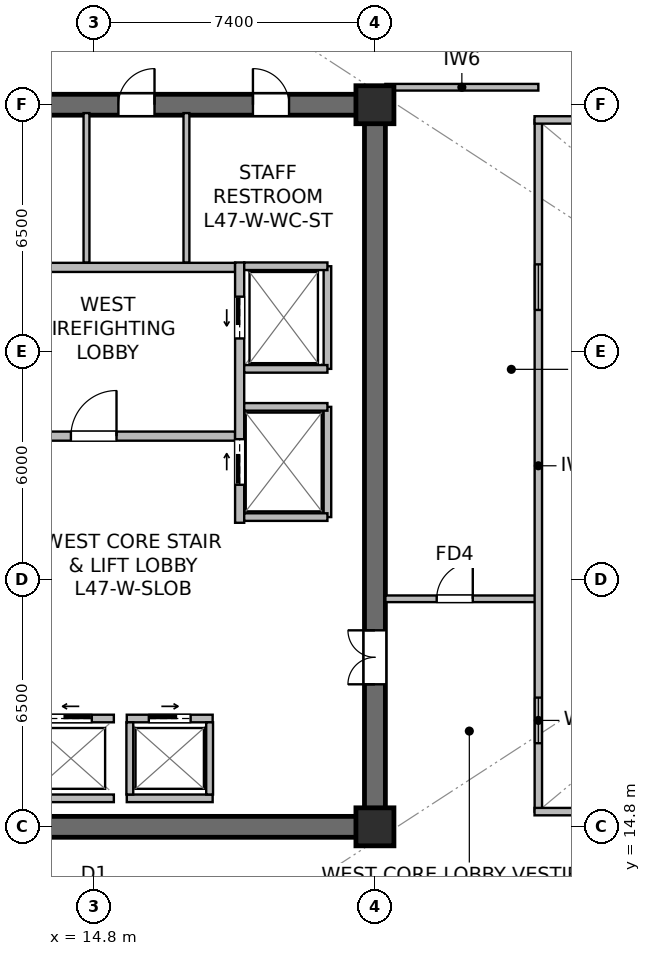
"""IFC4 building model, lengths in metres.
Left out: names, types, materials, properties, quantities, classifications, styles, units other than length and angle.
Written with IfcOpenShell. Run it as: python <this file> out.ifc"""

import sys

from ifc_helpers import new_model, si_unit, direction, frame, frame_2d, origin, origin_2d, place, context, subcontext, project, spatial, rectangle, extrude, source, transform, mapped, element, fill, save


model = new_model("IFC4")
c1 = context("Model", 3, precision=1e-05, world=origin(), true_north=direction((0.0, 1.0)))
c2 = subcontext(c1, "Body", "Model", "MODEL_VIEW")
j1 = project(units=[si_unit("LENGTHUNIT", "METRE"), si_unit("PLANEANGLEUNIT", "RADIAN")], contexts=[c1])
p1 = place(None, origin())
s1 = spatial("IfcSite", under=j1, at=p1, CompositionType="ELEMENT")
p2 = place(p1, origin())
s2 = spatial("IfcBuilding", under=s1, at=p2, CompositionType="ELEMENT")
p3 = place(p2, frame((0.0, 0.0, 196.6)))
s3 = spatial("IfcBuildingStorey", under=s2, at=p3, CompositionType="ELEMENT", Elevation=196.6)
p4 = place(p3, frame((7.125, 14.8, 0.0), z_axis=(0.0, 0.0, 1.0), x_axis=(1.0, 0.0, 0.0)))
e1 = element("IfcWall", 1, at=p4, inside=s3, PredefinedType="SHEAR", context=c2, shape_type="SweptSolid", body=[
    extrude(rectangle(XDim=15.35, YDim=0.55, at=frame_2d((7.675, 0.0))), origin(), (0.0, 0.0, 1.0), 4.5),
])
p5 = place(p3, frame((7.125, 33.8, 0.0), z_axis=(0.0, 0.0, 1.0), x_axis=(1.0, 0.0, 0.0)))
e2 = element("IfcWall", 2, at=p5, inside=s3, PredefinedType="SHEAR", context=c2, shape_type="SweptSolid", body=[
    extrude(rectangle(XDim=15.35, YDim=0.55, at=frame_2d((7.675, 0.0))), origin(), (0.0, 0.0, 1.0), 4.5),
])
p6 = place(p5, frame((8.325, 0.0, 0.0)))
e3 = element("IfcOpeningElement", 3, at=p6, cuts=e2, PredefinedType="OPENING", context=c2, shape_type="SweptSolid", body=[
    extrude(rectangle(XDim=0.95, YDim=2.15, at=frame_2d((0.475, 1.075))), frame((0.0, 0.285, 0.0), z_axis=(0.0, -1.0, 0.0), x_axis=(1.0, 0.0, 0.0)), (0.0, 0.0, 1.0), 0.57),
])
p7 = place(p5, frame((11.865, 0.0, 0.0)))
e4 = element("IfcOpeningElement", 4, at=p7, cuts=e2, PredefinedType="OPENING", context=c2, shape_type="SweptSolid", body=[
    extrude(rectangle(XDim=0.95, YDim=2.15, at=frame_2d((0.475, 1.075))), frame((0.0, 0.285, 0.0), z_axis=(0.0, -1.0, 0.0), x_axis=(1.0, 0.0, 0.0)), (0.0, 0.0, 1.0), 0.57),
])
p8 = place(p3, frame((22.2, 15.075, 0.0), z_axis=(0.0, 0.0, 1.0), x_axis=(0.0, 1.0, 0.0)))
e5 = element("IfcWall", 5, at=p8, inside=s3, PredefinedType="SHEAR", context=c2, shape_type="SweptSolid", body=[
    extrude(rectangle(XDim=18.45, YDim=0.55, at=frame_2d((9.225, 0.0))), origin(), (0.0, 0.0, 1.0), 4.5),
])
p9 = place(p8, frame((3.475, 0.0, 0.0)))
e6 = element("IfcOpeningElement", 6, at=p9, cuts=e5, PredefinedType="OPENING", context=c2, shape_type="SweptSolid", body=[
    extrude(rectangle(XDim=1.42, YDim=2.2, at=frame_2d((0.71, 1.1))), frame((0.0, 0.285, 0.0), z_axis=(0.0, -1.0, 0.0), x_axis=(1.0, 0.0, 0.0)), (0.0, 0.0, 1.0), 0.57),
])
m1 = source(origin(), c2, "Body", "SweptSolid", [
    extrude(rectangle(XDim=1.0, YDim=1.0, at=origin_2d()), origin(), (0.0, 0.0, 1.0), 4.8),
])
for number, where, z_axis, x_axis in (
    (7, (22.2, 14.8, 0.0), (0.0, 0.0, 1.0), (1.0, 0.0, 0.0)),
    (8, (22.2, 33.8, 0.0), (0.0, 0.0, 1.0), (1.0, 0.0, 0.0)),
):
    element("IfcColumn", number, at=place(p3, frame(where, z_axis=z_axis, x_axis=x_axis)), inside=s3, PredefinedType="COLUMN", context=c2, shape_type="MappedRepresentation", body=[
        mapped(m1, transform((0.0, 0.0, 0.0), scale=1.0)),
    ])
p10 = place(p3, frame((11.6, 25.08, 0.0), z_axis=(0.0, 0.0, 1.0), x_axis=(1.0, 0.0, 0.0)))
e9 = element("IfcWall", 9, at=p10, inside=s3, PredefinedType="SOLIDWALL", context=c2, shape_type="SweptSolid", body=[
    extrude(rectangle(XDim=6.92, YDim=0.24, at=frame_2d((3.46, 0.0))), origin(), (0.0, 0.0, 1.0), 3.897),
])
p11 = place(p10, frame((2.6, 0.0, 0.0)))
e10 = element("IfcOpeningElement", 10, at=p11, cuts=e9, PredefinedType="OPENING", context=c2, shape_type="SweptSolid", body=[
    extrude(rectangle(XDim=1.2, YDim=2.16, at=frame_2d((0.6, 1.08))), frame((0.0, 0.13, 0.0), z_axis=(0.0, -1.0, 0.0), x_axis=(1.0, 0.0, 0.0)), (0.0, 0.0, 1.0), 0.26),
])
p12 = place(p3, frame((11.6, 29.52, 0.0), z_axis=(0.0, 0.0, 1.0), x_axis=(1.0, 0.0, 0.0)))
e11 = element("IfcWall", 11, at=p12, inside=s3, PredefinedType="SOLIDWALL", context=c2, shape_type="SweptSolid", body=[
    extrude(rectangle(XDim=6.92, YDim=0.24, at=frame_2d((3.46, 0.0))), origin(), (0.0, 0.0, 1.0), 3.897),
])
p13 = place(p3, frame((18.64, 22.8, 0.0), z_axis=(0.0, 0.0, 1.0), x_axis=(0.0, 1.0, 0.0)))
e12 = element("IfcWall", 12, at=p13, inside=s3, PredefinedType="SOLIDWALL", context=c2, shape_type="SweptSolid", body=[
    extrude(rectangle(XDim=6.85, YDim=0.24, at=frame_2d((3.425, 0.0))), origin(), (0.0, 0.0, 1.0), 3.635),
])
p14 = place(p13, frame((4.85, 0.0, 0.0)))
e13 = element("IfcOpeningElement", 13, at=p14, cuts=e12, PredefinedType="OPENING", context=c2, shape_type="SweptSolid", body=[
    extrude(rectangle(XDim=1.1, YDim=2.22, at=frame_2d((0.55, 1.11))), frame((0.0, 0.13, 0.0), z_axis=(0.0, -1.0, 0.0), x_axis=(1.0, 0.0, 0.0)), (0.0, 0.0, 1.0), 0.26),
])
p15 = place(p13, frame((1.0, 0.0, 0.0)))
e14 = element("IfcOpeningElement", 14, at=p15, cuts=e12, PredefinedType="OPENING", context=c2, shape_type="SweptSolid", body=[
    extrude(rectangle(XDim=1.2, YDim=2.22, at=frame_2d((0.6, 1.11))), frame((0.0, 0.13, 0.0), z_axis=(0.0, -1.0, 0.0), x_axis=(1.0, 0.0, 0.0)), (0.0, 0.0, 1.0), 0.26),
])
p16 = place(p3, frame((13.07, 17.65, 0.0), z_axis=(0.0, 0.0, 1.0), x_axis=(1.0, 0.0, 0.0)))
e15 = element("IfcWall", 15, at=p16, inside=s3, PredefinedType="SOLIDWALL", context=c2, shape_type="SweptSolid", body=[
    extrude(rectangle(XDim=2.26, YDim=0.2, at=frame_2d((1.13, 0.0))), origin(), (0.0, 0.0, 1.0), 3.897),
])
p17 = place(p16, frame((0.58, 0.0, 0.0)))
e16 = element("IfcOpeningElement", 16, at=p17, cuts=e15, PredefinedType="OPENING", context=c2, shape_type="SweptSolid", body=[
    extrude(rectangle(XDim=1.1, YDim=2.22, at=frame_2d((0.55, 1.11))), frame((0.0, 0.11, 0.0), z_axis=(0.0, -1.0, 0.0), x_axis=(1.0, 0.0, 0.0)), (0.0, 0.0, 1.0), 0.22),
])
p18 = place(p3, frame((13.07, 15.55, 0.0), z_axis=(0.0, 0.0, 1.0), x_axis=(1.0, 0.0, 0.0)))
e17 = element("IfcWall", 17, at=p18, inside=s3, PredefinedType="SOLIDWALL", context=c2, shape_type="SweptSolid", body=[
    extrude(rectangle(XDim=2.26, YDim=0.2, at=frame_2d((1.13, 0.0))), origin(), (0.0, 0.0, 1.0), 3.897),
])
p19 = place(p3, frame((15.67, 17.65, 0.0), z_axis=(0.0, 0.0, 1.0), x_axis=(1.0, 0.0, 0.0)))
e18 = element("IfcWall", 18, at=p19, inside=s3, PredefinedType="SOLIDWALL", context=c2, shape_type="SweptSolid", body=[
    extrude(rectangle(XDim=2.26, YDim=0.2, at=frame_2d((1.13, 0.0))), origin(), (0.0, 0.0, 1.0), 4.5),
])
p20 = place(p19, frame((0.58, 0.0, 0.0)))
e19 = element("IfcOpeningElement", 19, at=p20, cuts=e18, PredefinedType="OPENING", context=c2, shape_type="SweptSolid", body=[
    extrude(rectangle(XDim=1.1, YDim=2.22, at=frame_2d((0.55, 1.11))), frame((0.0, 0.11, 0.0), z_axis=(0.0, -1.0, 0.0), x_axis=(1.0, 0.0, 0.0)), (0.0, 0.0, 1.0), 0.22),
])
p21 = place(p3, frame((15.67, 15.55, 0.0), z_axis=(0.0, 0.0, 1.0), x_axis=(1.0, 0.0, 0.0)))
e20 = element("IfcWall", 20, at=p21, inside=s3, PredefinedType="SOLIDWALL", context=c2, shape_type="SweptSolid", body=[
    extrude(rectangle(XDim=2.26, YDim=0.2, at=frame_2d((1.13, 0.0))), origin(), (0.0, 0.0, 1.0), 4.5),
])
for number, where, z_axis, x_axis in (
    (21, (15.75, 15.65, 0.0), (0.0, 0.0, 1.0), (0.0, 1.0, 0.0)),
    (22, (17.85, 15.65, 0.0), (0.0, 0.0, 1.0), (0.0, 1.0, 0.0)),
):
    element("IfcWall", number, at=place(p3, frame(where, z_axis=z_axis, x_axis=x_axis)), inside=s3, PredefinedType="SOLIDWALL", context=c2, shape_type="SweptSolid", body=[
        extrude(rectangle(XDim=1.9, YDim=0.18, at=frame_2d((0.95, 0.0))), origin(), (0.0, 0.0, 1.0), 4.5),
    ])
p22 = place(p3, frame((20.95, 26.85, 0.0), z_axis=(0.0, 0.0, 1.0), x_axis=(0.0, 1.0, 0.0)))
e23 = element("IfcWall", 23, at=p22, inside=s3, PredefinedType="SOLIDWALL", context=c2, shape_type="SweptSolid", body=[
    extrude(rectangle(XDim=2.7, YDim=0.2, at=frame_2d((1.35, 0.0))), origin(), (0.0, 0.0, 1.0), 4.5),
])
p23 = place(p3, frame((18.76, 29.55, 0.0), z_axis=(0.0, 0.0, 1.0), x_axis=(1.0, 0.0, 0.0)))
e24 = element("IfcWall", 24, at=p23, inside=s3, PredefinedType="SOLIDWALL", context=c2, shape_type="SweptSolid", body=[
    extrude(rectangle(XDim=2.19, YDim=0.2, at=frame_2d((1.095, 0.0))), origin(), (0.0, 0.0, 1.0), 4.5),
])
p24 = place(p3, frame((18.76, 26.85, 0.0), z_axis=(0.0, 0.0, 1.0), x_axis=(1.0, 0.0, 0.0)))
e25 = element("IfcWall", 25, at=p24, inside=s3, PredefinedType="SOLIDWALL", context=c2, shape_type="SweptSolid", body=[
    extrude(rectangle(XDim=2.19, YDim=0.2, at=frame_2d((1.095, 0.0))), origin(), (0.0, 0.0, 1.0), 3.897),
])
p25 = place(p3, frame((20.95, 22.95, 0.0), z_axis=(0.0, 0.0, 1.0), x_axis=(0.0, 1.0, 0.0)))
e26 = element("IfcWall", 26, at=p25, inside=s3, PredefinedType="SOLIDWALL", context=c2, shape_type="SweptSolid", body=[
    extrude(rectangle(XDim=2.9, YDim=0.2, at=frame_2d((1.45, 0.0))), origin(), (0.0, 0.0, 1.0), 3.635),
])
for number, where, z_axis, x_axis in (
    (27, (18.76, 25.85, 0.0), (0.0, 0.0, 1.0), (1.0, 0.0, 0.0)),
    (28, (18.76, 22.95, 0.0), (0.0, 0.0, 1.0), (1.0, 0.0, 0.0)),
):
    element("IfcWall", number, at=place(p3, frame(where, z_axis=z_axis, x_axis=x_axis)), inside=s3, PredefinedType="SOLIDWALL", context=c2, shape_type="SweptSolid", body=[
        extrude(rectangle(XDim=2.19, YDim=0.2, at=frame_2d((1.095, 0.0))), origin(), (0.0, 0.0, 1.0), 4.5),
    ])
p26 = place(p3, frame((14.61, 29.65, 0.0), z_axis=(0.0, 0.0, 1.0), x_axis=(0.0, 1.0, 0.0)))
e29 = element("IfcWall", 29, at=p26, inside=s3, PredefinedType="PLUMBINGWALL", context=c2, shape_type="SweptSolid", body=[
    extrude(rectangle(XDim=3.93, YDim=0.155, at=frame_2d((1.965, 0.0))), origin(), (0.0, 0.0, 1.0), 3.897),
])
p27 = place(p3, frame((17.24, 29.65, 0.0), z_axis=(0.0, 0.0, 1.0), x_axis=(0.0, 1.0, 0.0)))
e30 = element("IfcWall", 30, at=p27, inside=s3, PredefinedType="PLUMBINGWALL", context=c2, shape_type="SweptSolid", body=[
    extrude(rectangle(XDim=3.93, YDim=0.155, at=frame_2d((1.965, 0.0))), origin(), (0.0, 0.0, 1.0), 4.5),
])
p28 = place(p3, frame((22.475, 34.26, 0.0), z_axis=(0.0, 0.0, 1.0), x_axis=(1.0, 0.0, 0.0)))
e31 = element("IfcWall", 31, at=p28, inside=s3, PredefinedType="PARTITIONING", context=c2, shape_type="SweptSolid", body=[
    extrude(rectangle(XDim=4.025, YDim=0.175, at=frame_2d((2.012, 0.0))), origin(), (0.0, 0.0, 1.0), 4.185),
])
p29 = place(p3, frame((22.475, 20.8, 0.0), z_axis=(0.0, 0.0, 1.0), x_axis=(1.0, 0.0, 0.0)))
e32 = element("IfcWall", 32, at=p29, inside=s3, PredefinedType="PARTITIONING", context=c2, shape_type="SweptSolid", body=[
    extrude(rectangle(XDim=4.025, YDim=0.175, at=frame_2d((2.012, 0.0))), origin(), (0.0, 0.0, 1.0), 4.5),
])
p30 = place(p29, frame((1.35, 0.0, 0.0)))
e33 = element("IfcOpeningElement", 33, at=p30, cuts=e32, PredefinedType="OPENING", context=c2, shape_type="SweptSolid", body=[
    extrude(rectangle(XDim=0.95, YDim=2.15, at=frame_2d((0.475, 1.075))), frame((0.0, 0.098, 0.0), z_axis=(0.0, -1.0, 0.0), x_axis=(1.0, 0.0, 0.0)), (0.0, 0.0, 1.0), 0.195),
])
p31 = place(p3, frame((26.5, 15.2, 0.0), z_axis=(0.0, 0.0, 1.0), x_axis=(0.0, 1.0, 0.0)))
e34 = element("IfcWall", 34, at=p31, inside=s3, PredefinedType="SOLIDWALL", context=c2, shape_type="SweptSolid", body=[
    extrude(rectangle(XDim=18.2, YDim=0.195, at=frame_2d((9.1, 0.0))), origin(), (0.0, 0.0, 1.0), 4.5),
])
p32 = place(p31, frame((1.8, 0.0, 0.9)))
e35 = element("IfcOpeningElement", 35, at=p32, cuts=e34, PredefinedType="OPENING", context=c2, shape_type="SweptSolid", body=[
    extrude(rectangle(XDim=1.2, YDim=1.35, at=frame_2d((0.6, 0.675))), frame((0.0, 0.107, 0.0), z_axis=(0.0, -1.0, 0.0), x_axis=(1.0, 0.0, 0.0)), (0.0, 0.0, 1.0), 0.215),
])
p33 = place(p31, frame((13.2, 0.0, 0.9)))
e36 = element("IfcOpeningElement", 36, at=p33, cuts=e34, PredefinedType="OPENING", context=c2, shape_type="SweptSolid", body=[
    extrude(rectangle(XDim=1.2, YDim=1.35, at=frame_2d((0.6, 0.675))), frame((0.0, 0.107, 0.0), z_axis=(0.0, -1.0, 0.0), x_axis=(1.0, 0.0, 0.0)), (0.0, 0.0, 1.0), 0.215),
])
for number, where, z_axis, x_axis in (
    (37, (26.4, 15.2, 0.0), (0.0, 0.0, 1.0), (1.0, 0.0, 0.0)),
    (38, (26.4, 33.4, 0.0), (0.0, 0.0, 1.0), (1.0, 0.0, 0.0)),
):
    element("IfcWall", number, at=place(p3, frame(where, z_axis=z_axis, x_axis=x_axis)), inside=s3, PredefinedType="SOLIDWALL", context=c2, shape_type="SweptSolid", body=[
        extrude(rectangle(XDim=22.0, YDim=0.195, at=frame_2d((11.0, 0.0))), origin(), (0.0, 0.0, 1.0), 4.5),
    ])
m2 = source(origin(), c2, "Body", "SweptSolid", [
    extrude(rectangle(XDim=1.2, YDim=1.35, at=frame_2d((0.6, 0.675))), frame((0.0, 0.03, 0.0), z_axis=(0.0, -1.0, 0.0), x_axis=(1.0, 0.0, 0.0)), (0.0, 0.0, 1.0), 0.06),
])
p34 = place(p32, origin())
e39 = element("IfcWindow", 39, at=p34, inside=s3, PartitioningType="SINGLE_PANEL", PredefinedType="WINDOW", context=c2, shape_type="MappedRepresentation", body=[
    mapped(m2, transform((0.0, 0.0, 0.0), scale=1.0)),
])
fill(e35, e39)
p35 = place(p33, origin())
e40 = element("IfcWindow", 40, at=p35, inside=s3, PartitioningType="SINGLE_PANEL", PredefinedType="WINDOW", context=c2, shape_type="MappedRepresentation", body=[
    mapped(m2, transform((0.0, 0.0, 0.0), scale=1.0)),
])
fill(e36, e40)
m3 = source(origin(), c2, "Body", "SweptSolid", [
    extrude(rectangle(XDim=1.2, YDim=2.16, at=frame_2d((0.6, 1.08))), frame((0.0, 0.025, 0.0), z_axis=(0.0, -1.0, 0.0), x_axis=(1.0, 0.0, 0.0)), (0.0, 0.0, 1.0), 0.05),
])
p36 = place(p11, origin())
e41 = element("IfcDoor", 41, at=p36, inside=s3, OperationType="SINGLE_SWING_RIGHT", PredefinedType="DOOR", context=c2, shape_type="MappedRepresentation", body=[
    mapped(m3, transform((0.0, 0.0, 0.0), scale=1.0)),
])
fill(e10, e41)
m4 = source(origin(), c2, "Body", "SweptSolid", [
    extrude(rectangle(XDim=1.1, YDim=2.22, at=frame_2d((0.55, 1.11))), frame((0.0, 0.025, 0.0), z_axis=(0.0, -1.0, 0.0), x_axis=(1.0, 0.0, 0.0)), (0.0, 0.0, 1.0), 0.05),
])
p37 = place(p17, origin())
e42 = element("IfcDoor", 42, at=p37, inside=s3, OperationType="SLIDING_TO_LEFT", PredefinedType="USERDEFINED", context=c2, shape_type="MappedRepresentation", body=[
    mapped(m4, transform((0.0, 0.0, 0.0), scale=1.0)),
])
fill(e16, e42)
p38 = place(p20, origin())
e43 = element("IfcDoor", 43, at=p38, inside=s3, OperationType="SLIDING_TO_RIGHT", PredefinedType="USERDEFINED", context=c2, shape_type="MappedRepresentation", body=[
    mapped(m4, transform((0.0, 0.0, 0.0), scale=1.0)),
])
fill(e19, e43)
p39 = place(p14, origin())
e44 = element("IfcDoor", 44, at=p39, inside=s3, OperationType="SLIDING_TO_LEFT", PredefinedType="USERDEFINED", context=c2, shape_type="MappedRepresentation", body=[
    mapped(m4, transform((0.0, 0.0, 0.0), scale=1.0)),
])
fill(e13, e44)
m5 = source(origin(), c2, "Body", "SweptSolid", [
    extrude(rectangle(XDim=1.2, YDim=2.22, at=frame_2d((0.6, 1.11))), frame((0.0, 0.025, 0.0), z_axis=(0.0, -1.0, 0.0), x_axis=(1.0, 0.0, 0.0)), (0.0, 0.0, 1.0), 0.05),
])
p40 = place(p15, origin())
e45 = element("IfcDoor", 45, at=p40, inside=s3, OperationType="SLIDING_TO_RIGHT", PredefinedType="USERDEFINED", context=c2, shape_type="MappedRepresentation", body=[
    mapped(m5, transform((0.0, 0.0, 0.0), scale=1.0)),
])
fill(e14, e45)
m6 = source(origin(), c2, "Body", "SweptSolid", [
    extrude(rectangle(XDim=1.42, YDim=2.2, at=frame_2d((0.71, 1.1))), frame((0.0, 0.025, 0.0), z_axis=(0.0, -1.0, 0.0), x_axis=(1.0, 0.0, 0.0)), (0.0, 0.0, 1.0), 0.05),
])
p41 = place(p9, origin())
e46 = element("IfcDoor", 46, at=p41, inside=s3, OperationType="DOUBLE_DOOR_SINGLE_SWING", PredefinedType="DOOR", context=c2, shape_type="MappedRepresentation", body=[
    mapped(m6, transform((0.0, 0.0, 0.0), scale=1.0)),
])
fill(e6, e46)
m7 = source(origin(), c2, "Body", "SweptSolid", [
    extrude(rectangle(XDim=0.95, YDim=2.15, at=frame_2d((0.475, 1.075))), frame((0.0, 0.025, 0.0), z_axis=(0.0, -1.0, 0.0), x_axis=(1.0, 0.0, 0.0)), (0.0, 0.0, 1.0), 0.05),
])
p42 = place(p6, origin())
e47 = element("IfcDoor", 47, at=p42, inside=s3, OperationType="SINGLE_SWING_RIGHT", PredefinedType="DOOR", context=c2, shape_type="MappedRepresentation", body=[
    mapped(m7, transform((0.0, 0.0, 0.0), scale=1.0)),
])
fill(e3, e47)
p43 = place(p7, origin())
e48 = element("IfcDoor", 48, at=p43, inside=s3, OperationType="SINGLE_SWING_LEFT", PredefinedType="DOOR", context=c2, shape_type="MappedRepresentation", body=[
    mapped(m7, transform((0.0, 0.0, 0.0), scale=1.0)),
])
fill(e4, e48)
p44 = place(p30, origin())
e49 = element("IfcDoor", 49, at=p44, inside=s3, OperationType="SINGLE_SWING_RIGHT", PredefinedType="DOOR", context=c2, shape_type="MappedRepresentation", body=[
    mapped(m7, transform((0.0, 0.0, 0.0), scale=1.0)),
])
fill(e33, e49)
save(model, sys.argv[1])
